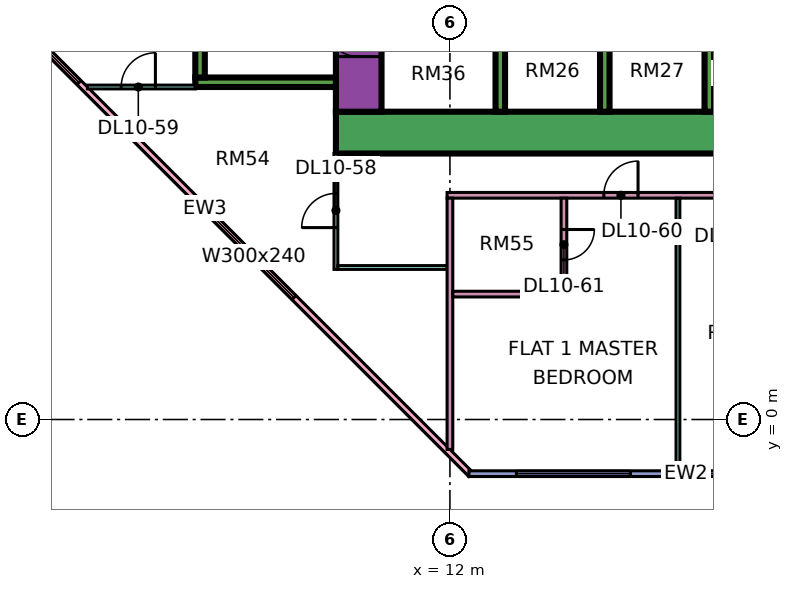
"""IFC4 building model, lengths in metres.
Left out: names, types, materials, properties, quantities, classifications, styles, units other than length and angle.
Written with IfcOpenShell. Run it as: python <this file> out.ifc"""

import sys

from ifc_helpers import new_model, si_unit, direction, frame, frame_2d, origin, place, context, subcontext, project, spatial, rectangle, extrude, element, fill, save


model = new_model("IFC4")
c1 = context("Model", 3, precision=1e-05, world=origin(), true_north=direction((0.0, 1.0)))
c2 = subcontext(c1, "Body", "Model", "MODEL_VIEW")
j1 = project(units=[si_unit("LENGTHUNIT", "METRE"), si_unit("PLANEANGLEUNIT", "RADIAN")], contexts=[c1])
p1 = place(None, origin())
s1 = spatial("IfcSite", under=j1, at=p1, CompositionType="ELEMENT")
p2 = place(p1, origin())
s2 = spatial("IfcBuilding", under=s1, at=p2, CompositionType="ELEMENT")
p3 = place(p2, frame((0.0, 0.0, 52.65)))
s3 = spatial("IfcBuildingStorey", under=s2, at=p3, CompositionType="ELEMENT", Elevation=52.65)
p4 = place(p3, frame((9.0, 7.55, 0.0), z_axis=(0.0, 0.0, 1.0), x_axis=(1.0, 0.0, 0.0)))
e1 = element("IfcWall", 1, at=p4, inside=s3, PredefinedType="SHEAR", context=c2, shape_type="SweptSolid", body=[
    extrude(rectangle(XDim=25.0, YDim=1.1, at=frame_2d((12.5, 0.0))), origin(), (0.0, 0.0, 1.0), 3.75),
])
p5 = place(p3, frame((9.6, 8.1, 0.0), z_axis=(0.0, 0.0, 1.0), x_axis=(0.0, 1.0, 0.0)))
e2 = element("IfcWall", 2, at=p5, inside=s3, PredefinedType="SHEAR", context=c2, shape_type="SweptSolid", body=[
    extrude(rectangle(XDim=10.8, YDim=1.2, at=frame_2d((5.4, 0.0))), origin(), (0.0, 0.0, 1.0), 3.75),
])
p6 = place(p5, frame((3.775, 0.0, 0.0)))
e3 = element("IfcOpeningElement", 3, at=p6, cuts=e2, PredefinedType="OPENING", context=c2, shape_type="SweptSolid", body=[
    extrude(rectangle(XDim=1.1, YDim=2.2, at=frame_2d((0.55, 1.1))), frame((0.0, 0.61, 0.0), z_axis=(0.0, -1.0, 0.0), x_axis=(1.0, 0.0, 0.0)), (0.0, 0.0, 1.0), 1.22),
])
p7 = place(p5, frame((6.275, 0.0, 0.0)))
e4 = element("IfcOpeningElement", 4, at=p7, cuts=e2, PredefinedType="OPENING", context=c2, shape_type="SweptSolid", body=[
    extrude(rectangle(XDim=1.1, YDim=2.2, at=frame_2d((0.55, 1.1))), frame((0.0, 0.61, 0.0), z_axis=(0.0, -1.0, 0.0), x_axis=(1.0, 0.0, 0.0)), (0.0, 0.0, 1.0), 1.22),
])
p8 = place(p5, frame((8.95, 0.0, 0.0)))
e5 = element("IfcOpeningElement", 5, at=p8, cuts=e2, PredefinedType="OPENING", context=c2, shape_type="SweptSolid", body=[
    extrude(rectangle(XDim=1.1, YDim=2.2, at=frame_2d((0.55, 1.1))), frame((0.0, 0.61, 0.0), z_axis=(0.0, -1.0, 0.0), x_axis=(1.0, 0.0, 0.0)), (0.0, 0.0, 1.0), 1.22),
])
p9 = place(p5, frame((1.45, 0.0, 0.0)))
e6 = element("IfcOpeningElement", 6, at=p9, cuts=e2, PredefinedType="OPENING", context=c2, shape_type="SweptSolid", body=[
    extrude(rectangle(XDim=0.9, YDim=2.1, at=frame_2d((0.45, 1.05))), frame((0.0, 0.61, 0.0), z_axis=(0.0, -1.0, 0.0), x_axis=(1.0, 0.0, 0.0)), (0.0, 0.0, 1.0), 1.22),
])
p10 = place(p3, frame((13.325, 8.1, 0.0), z_axis=(0.0, 0.0, 1.0), x_axis=(0.0, 1.0, 0.0)))
e7 = element("IfcWall", 7, at=p10, inside=s3, PredefinedType="SHEAR", context=c2, shape_type="SweptSolid", body=[
    extrude(rectangle(XDim=10.8, YDim=0.25, at=frame_2d((5.4, 0.0))), origin(), (0.0, 0.0, 1.0), 3.75),
])
for number, where, z_axis, x_axis in (
    (8, (16.075, 8.1, 0.0), (0.0, 0.0, 1.0), (0.0, 1.0, 0.0)),
    (9, (18.825, 8.1, 0.0), (0.0, 0.0, 1.0), (0.0, 1.0, 0.0)),
):
    element("IfcWall", number, at=place(p3, frame(where, z_axis=z_axis, x_axis=x_axis)), inside=s3, PredefinedType="SHEAR", context=c2, shape_type="SweptSolid", body=[
        extrude(rectangle(XDim=3.1, YDim=0.25, at=frame_2d((1.55, 0.0))), origin(), (0.0, 0.0, 1.0), 3.75),
    ])
p11 = place(p3, frame((5.3, 8.875, 0.0), z_axis=(0.0, 0.0, 1.0), x_axis=(1.0, 0.0, 0.0)))
e10 = element("IfcWall", 10, at=p11, inside=s3, PredefinedType="SHEAR", context=c2, shape_type="SweptSolid", body=[
    extrude(rectangle(XDim=3.7, YDim=0.25, at=frame_2d((1.85, 0.0))), origin(), (0.0, 0.0, 1.0), 3.75),
])
p12 = place(p3, frame((5.425, 9.0, 0.0), z_axis=(0.0, 0.0, 1.0), x_axis=(0.0, 1.0, 0.0)))
e11 = element("IfcWall", 11, at=p12, inside=s3, PredefinedType="SHEAR", context=c2, shape_type="SweptSolid", body=[
    extrude(rectangle(XDim=4.0, YDim=0.25, at=frame_2d((2.0, 0.0))), origin(), (0.0, 0.0, 1.0), 3.75),
])
p13 = place(p3, frame((-1.447, 12.553, 0.0), z_axis=(0.0, 0.0, 1.0), x_axis=(0.707106781187, -0.707106781187, 0.0)))
e12 = element("IfcWall", 12, at=p13, inside=s3, PredefinedType="SOLIDWALL", context=c2, shape_type="SweptSolid", body=[
    extrude(rectangle(XDim=19.799, YDim=0.15, at=frame_2d((9.899, 0.0))), origin(), (0.0, 0.0, 1.0), 3.35),
])
p14 = place(p13, frame((2.212, 0.0, 0.45)))
e13 = element("IfcOpeningElement", 13, at=p14, cuts=e12, PredefinedType="OPENING", context=c2, shape_type="SweptSolid", body=[
    extrude(rectangle(XDim=3.0, YDim=2.4, at=frame_2d((1.5, 1.2))), frame((0.0, 0.085, 0.0), z_axis=(0.0, -1.0, 0.0), x_axis=(1.0, 0.0, 0.0)), (0.0, 0.0, 1.0), 0.17),
])
p15 = place(p13, frame((10.216, 0.0, 0.45)))
e14 = element("IfcOpeningElement", 14, at=p15, cuts=e12, PredefinedType="OPENING", context=c2, shape_type="SweptSolid", body=[
    extrude(rectangle(XDim=3.0, YDim=2.4, at=frame_2d((1.5, 1.2))), frame((0.0, 0.085, 0.0), z_axis=(0.0, -1.0, 0.0), x_axis=(1.0, 0.0, 0.0)), (0.0, 0.0, 1.0), 0.17),
])
p16 = place(p3, frame((12.5, -1.425, 0.0), z_axis=(0.0, 0.0, 1.0), x_axis=(1.0, 0.0, 0.0)))
e15 = element("IfcWall", 15, at=p16, inside=s3, PredefinedType="SOLIDWALL", context=c2, shape_type="SweptSolid", body=[
    extrude(rectangle(XDim=11.425, YDim=0.15, at=frame_2d((5.712, 0.0))), origin(), (0.0, 0.0, 1.0), 3.35),
])
p17 = place(p16, frame((1.25, 0.0, 0.45)))
e16 = element("IfcOpeningElement", 16, at=p17, cuts=e15, PredefinedType="OPENING", context=c2, shape_type="SweptSolid", body=[
    extrude(rectangle(XDim=3.0, YDim=2.4, at=frame_2d((1.5, 1.2))), frame((0.0, 0.085, 0.0), z_axis=(0.0, -1.0, 0.0), x_axis=(1.0, 0.0, 0.0)), (0.0, 0.0, 1.0), 0.17),
])
p18 = place(p16, frame((6.1, 0.0, 0.45)))
e17 = element("IfcOpeningElement", 17, at=p18, cuts=e15, PredefinedType="OPENING", context=c2, shape_type="SweptSolid", body=[
    extrude(rectangle(XDim=1.8, YDim=2.4, at=frame_2d((0.9, 1.2))), frame((0.0, 0.085, 0.0), z_axis=(0.0, -1.0, 0.0), x_axis=(1.0, 0.0, 0.0)), (0.0, 0.0, 1.0), 0.17),
])
p19 = place(p16, frame((9.062, 0.0, 0.45)))
e18 = element("IfcOpeningElement", 18, at=p19, cuts=e15, PredefinedType="OPENING", context=c2, shape_type="SweptSolid", body=[
    extrude(rectangle(XDim=1.8, YDim=2.4, at=frame_2d((0.9, 1.2))), frame((0.0, 0.085, 0.0), z_axis=(0.0, -1.0, 0.0), x_axis=(1.0, 0.0, 0.0)), (0.0, 0.0, 1.0), 0.17),
])
p20 = place(p3, frame((2.461, 8.75, 0.0), z_axis=(0.0, 0.0, 1.0), x_axis=(1.0, 0.0, 0.0)))
e19 = element("IfcWall", 19, at=p20, inside=s3, PredefinedType="PARTITIONING", context=c2, shape_type="SweptSolid", body=[
    extrude(rectangle(XDim=2.839, YDim=0.1, at=frame_2d((1.419, 0.0))), origin(), (0.0, 0.0, 1.0), 3.35),
])
p21 = place(p20, frame((0.889, 0.0, 0.0)))
e20 = element("IfcOpeningElement", 20, at=p21, cuts=e19, PredefinedType="OPENING", context=c2, shape_type="SweptSolid", body=[
    extrude(rectangle(XDim=0.9, YDim=2.1, at=frame_2d((0.45, 1.05))), frame((0.0, 0.06, 0.0), z_axis=(0.0, -1.0, 0.0), x_axis=(1.0, 0.0, 0.0)), (0.0, 0.0, 1.0), 0.12),
])
p22 = place(p3, frame((9.0, 3.95, 0.0), z_axis=(0.0, 0.0, 1.0), x_axis=(0.0, 1.0, 0.0)))
e21 = element("IfcWall", 21, at=p22, inside=s3, PredefinedType="PARTITIONING", context=c2, shape_type="SweptSolid", body=[
    extrude(rectangle(XDim=3.05, YDim=0.1, at=frame_2d((1.525, 0.0))), origin(), (0.0, 0.0, 1.0), 3.35),
])
p23 = place(p22, frame((1.1, 0.0, 0.0)))
e22 = element("IfcOpeningElement", 22, at=p23, cuts=e21, PredefinedType="OPENING", context=c2, shape_type="SweptSolid", body=[
    extrude(rectangle(XDim=0.9, YDim=2.1, at=frame_2d((0.45, 1.05))), frame((0.0, 0.06, 0.0), z_axis=(0.0, -1.0, 0.0), x_axis=(1.0, 0.0, 0.0)), (0.0, 0.0, 1.0), 0.12),
])
p24 = place(p3, frame((9.05, 4.0, 0.0), z_axis=(0.0, 0.0, 1.0), x_axis=(1.0, 0.0, 0.0)))
e23 = element("IfcWall", 23, at=p24, inside=s3, PredefinedType="PARTITIONING", context=c2, shape_type="SweptSolid", body=[
    extrude(rectangle(XDim=2.875, YDim=0.1, at=frame_2d((1.438, 0.0))), origin(), (0.0, 0.0, 1.0), 3.35),
])
p25 = place(p3, frame((11.925, 5.9, 0.0), z_axis=(0.0, 0.0, 1.0), x_axis=(1.0, 0.0, 0.0)))
e24 = element("IfcWall", 24, at=p25, inside=s3, PredefinedType="PARTITIONING", context=c2, shape_type="SweptSolid", body=[
    extrude(rectangle(XDim=21.125, YDim=0.15, at=frame_2d((10.562, 0.0))), origin(), (0.0, 0.0, 1.0), 3.35),
])
p26 = place(p25, frame((7.125, 0.0, 0.0)))
e25 = element("IfcOpeningElement", 25, at=p26, cuts=e24, PredefinedType="OPENING", context=c2, shape_type="SweptSolid", body=[
    extrude(rectangle(XDim=0.9, YDim=2.1, at=frame_2d((0.45, 1.05))), frame((0.0, 0.085, 0.0), z_axis=(0.0, -1.0, 0.0), x_axis=(1.0, 0.0, 0.0)), (0.0, 0.0, 1.0), 0.17),
])
p27 = place(p25, frame((4.125, 0.0, 0.0)))
e26 = element("IfcOpeningElement", 26, at=p27, cuts=e24, PredefinedType="OPENING", context=c2, shape_type="SweptSolid", body=[
    extrude(rectangle(XDim=0.9, YDim=2.1, at=frame_2d((0.45, 1.05))), frame((0.0, 0.085, 0.0), z_axis=(0.0, -1.0, 0.0), x_axis=(1.0, 0.0, 0.0)), (0.0, 0.0, 1.0), 0.17),
])
p28 = place(p25, frame((13.125, 0.0, 0.0)))
e27 = element("IfcOpeningElement", 27, at=p28, cuts=e24, PredefinedType="OPENING", context=c2, shape_type="SweptSolid", body=[
    extrude(rectangle(XDim=0.9, YDim=2.1, at=frame_2d((0.45, 1.05))), frame((0.0, 0.085, 0.0), z_axis=(0.0, -1.0, 0.0), x_axis=(1.0, 0.0, 0.0)), (0.0, 0.0, 1.0), 0.17),
])
p29 = place(p3, frame((12.0, -0.788, 0.0), z_axis=(0.0, 0.0, 1.0), x_axis=(0.0, 1.0, 0.0)))
e28 = element("IfcWall", 28, at=p29, inside=s3, PredefinedType="PARTITIONING", context=c2, shape_type="SweptSolid", body=[
    extrude(rectangle(XDim=6.613, YDim=0.15, at=frame_2d((3.306, 0.0))), origin(), (0.0, 0.0, 1.0), 3.35),
])
p30 = place(p3, frame((12.075, 3.3, 0.0), z_axis=(0.0, 0.0, 1.0), x_axis=(1.0, 0.0, 0.0)))
e29 = element("IfcWall", 29, at=p30, inside=s3, PredefinedType="PARTITIONING", context=c2, shape_type="SweptSolid", body=[
    extrude(rectangle(XDim=3.0, YDim=0.15, at=frame_2d((1.5, 0.0))), origin(), (0.0, 0.0, 1.0), 3.35),
])
p31 = place(p3, frame((15.0, 3.375, 0.0), z_axis=(0.0, 0.0, 1.0), x_axis=(0.0, 1.0, 0.0)))
e30 = element("IfcWall", 30, at=p31, inside=s3, PredefinedType="PARTITIONING", context=c2, shape_type="SweptSolid", body=[
    extrude(rectangle(XDim=2.45, YDim=0.15, at=frame_2d((1.225, 0.0))), origin(), (0.0, 0.0, 1.0), 3.35),
])
p32 = place(p31, frame((0.825, 0.0, 0.0)))
e31 = element("IfcOpeningElement", 31, at=p32, cuts=e30, PredefinedType="OPENING", context=c2, shape_type="SweptSolid", body=[
    extrude(rectangle(XDim=0.8, YDim=2.1, at=frame_2d((0.4, 1.05))), frame((0.0, 0.085, 0.0), z_axis=(0.0, -1.0, 0.0), x_axis=(1.0, 0.0, 0.0)), (0.0, 0.0, 1.0), 0.17),
])
p33 = place(p3, frame((18.0, -1.351, 0.0), z_axis=(0.0, 0.0, 1.0), x_axis=(0.0, 1.0, 0.0)))
e32 = element("IfcWall", 32, at=p33, inside=s3, PredefinedType="PARTITIONING", context=c2, shape_type="SweptSolid", body=[
    extrude(rectangle(XDim=7.176, YDim=0.1, at=frame_2d((3.588, 0.0))), origin(), (0.0, 0.0, 1.0), 3.35),
])
p34 = place(p14, origin())
e33 = element("IfcWindow", 33, at=p34, inside=s3, PartitioningType="SINGLE_PANEL", PredefinedType="WINDOW", context=c2, shape_type="SweptSolid", body=[
    extrude(rectangle(XDim=3.0, YDim=2.4, at=frame_2d((1.5, 1.2))), frame((0.0, 0.03, 0.0), z_axis=(0.0, -1.0, 0.0), x_axis=(1.0, 0.0, 0.0)), (0.0, 0.0, 1.0), 0.06),
])
fill(e13, e33)
p35 = place(p15, origin())
e34 = element("IfcWindow", 34, at=p35, inside=s3, PartitioningType="SINGLE_PANEL", PredefinedType="WINDOW", context=c2, shape_type="SweptSolid", body=[
    extrude(rectangle(XDim=3.0, YDim=2.4, at=frame_2d((1.5, 1.2))), frame((0.0, 0.03, 0.0), z_axis=(0.0, -1.0, 0.0), x_axis=(1.0, 0.0, 0.0)), (0.0, 0.0, 1.0), 0.06),
])
fill(e14, e34)
p36 = place(p17, origin())
e35 = element("IfcWindow", 35, at=p36, inside=s3, PartitioningType="SINGLE_PANEL", PredefinedType="WINDOW", context=c2, shape_type="SweptSolid", body=[
    extrude(rectangle(XDim=3.0, YDim=2.4, at=frame_2d((1.5, 1.2))), frame((0.0, 0.03, 0.0), z_axis=(0.0, -1.0, 0.0), x_axis=(1.0, 0.0, 0.0)), (0.0, 0.0, 1.0), 0.06),
])
fill(e16, e35)
p37 = place(p18, origin())
e36 = element("IfcWindow", 36, at=p37, inside=s3, PartitioningType="SINGLE_PANEL", PredefinedType="WINDOW", context=c2, shape_type="SweptSolid", body=[
    extrude(rectangle(XDim=1.8, YDim=2.4, at=frame_2d((0.9, 1.2))), frame((0.0, 0.03, 0.0), z_axis=(0.0, -1.0, 0.0), x_axis=(1.0, 0.0, 0.0)), (0.0, 0.0, 1.0), 0.06),
])
fill(e17, e36)
p38 = place(p9, frame((0.9, 0.0, 0.0), z_axis=(0.0, 0.0, 1.0), x_axis=(-1.0, 0.0, 0.0)))
e37 = element("IfcDoor", 37, at=p38, inside=s3, OperationType="SINGLE_SWING_RIGHT", PredefinedType="DOOR", context=c2, shape_type="SweptSolid", body=[
    extrude(rectangle(XDim=0.9, YDim=2.1, at=frame_2d((0.45, 1.05))), frame((0.0, 0.025, 0.0), z_axis=(0.0, -1.0, 0.0), x_axis=(1.0, 0.0, 0.0)), (0.0, 0.0, 1.0), 0.05),
])
fill(e6, e37)
p39 = place(p23, origin())
e38 = element("IfcDoor", 38, at=p39, inside=s3, OperationType="SINGLE_SWING_LEFT", PredefinedType="DOOR", context=c2, shape_type="SweptSolid", body=[
    extrude(rectangle(XDim=0.9, YDim=2.1, at=frame_2d((0.45, 1.05))), frame((0.0, 0.025, 0.0), z_axis=(0.0, -1.0, 0.0), x_axis=(1.0, 0.0, 0.0)), (0.0, 0.0, 1.0), 0.05),
])
fill(e22, e38)
p40 = place(p21, frame((0.9, 0.0, 0.0), z_axis=(0.0, 0.0, 1.0), x_axis=(-1.0, 0.0, 0.0)))
e39 = element("IfcDoor", 39, at=p40, inside=s3, OperationType="SINGLE_SWING_RIGHT", PredefinedType="DOOR", context=c2, shape_type="SweptSolid", body=[
    extrude(rectangle(XDim=0.9, YDim=2.1, at=frame_2d((0.45, 1.05))), frame((0.0, 0.025, 0.0), z_axis=(0.0, -1.0, 0.0), x_axis=(1.0, 0.0, 0.0)), (0.0, 0.0, 1.0), 0.05),
])
fill(e20, e39)
p41 = place(p27, frame((0.9, 0.0, 0.0), z_axis=(0.0, 0.0, 1.0), x_axis=(-1.0, 0.0, 0.0)))
e40 = element("IfcDoor", 40, at=p41, inside=s3, OperationType="SINGLE_SWING_RIGHT", PredefinedType="DOOR", context=c2, shape_type="SweptSolid", body=[
    extrude(rectangle(XDim=0.9, YDim=2.1, at=frame_2d((0.45, 1.05))), frame((0.0, 0.025, 0.0), z_axis=(0.0, -1.0, 0.0), x_axis=(1.0, 0.0, 0.0)), (0.0, 0.0, 1.0), 0.05),
])
fill(e26, e40)
p42 = place(p32, origin())
e41 = element("IfcDoor", 41, at=p42, inside=s3, OperationType="SINGLE_SWING_RIGHT", PredefinedType="DOOR", context=c2, shape_type="SweptSolid", body=[
    extrude(rectangle(XDim=0.8, YDim=2.1, at=frame_2d((0.4, 1.05))), frame((0.0, 0.025, 0.0), z_axis=(0.0, -1.0, 0.0), x_axis=(1.0, 0.0, 0.0)), (0.0, 0.0, 1.0), 0.05),
])
fill(e31, e41)
save(model, sys.argv[1])
